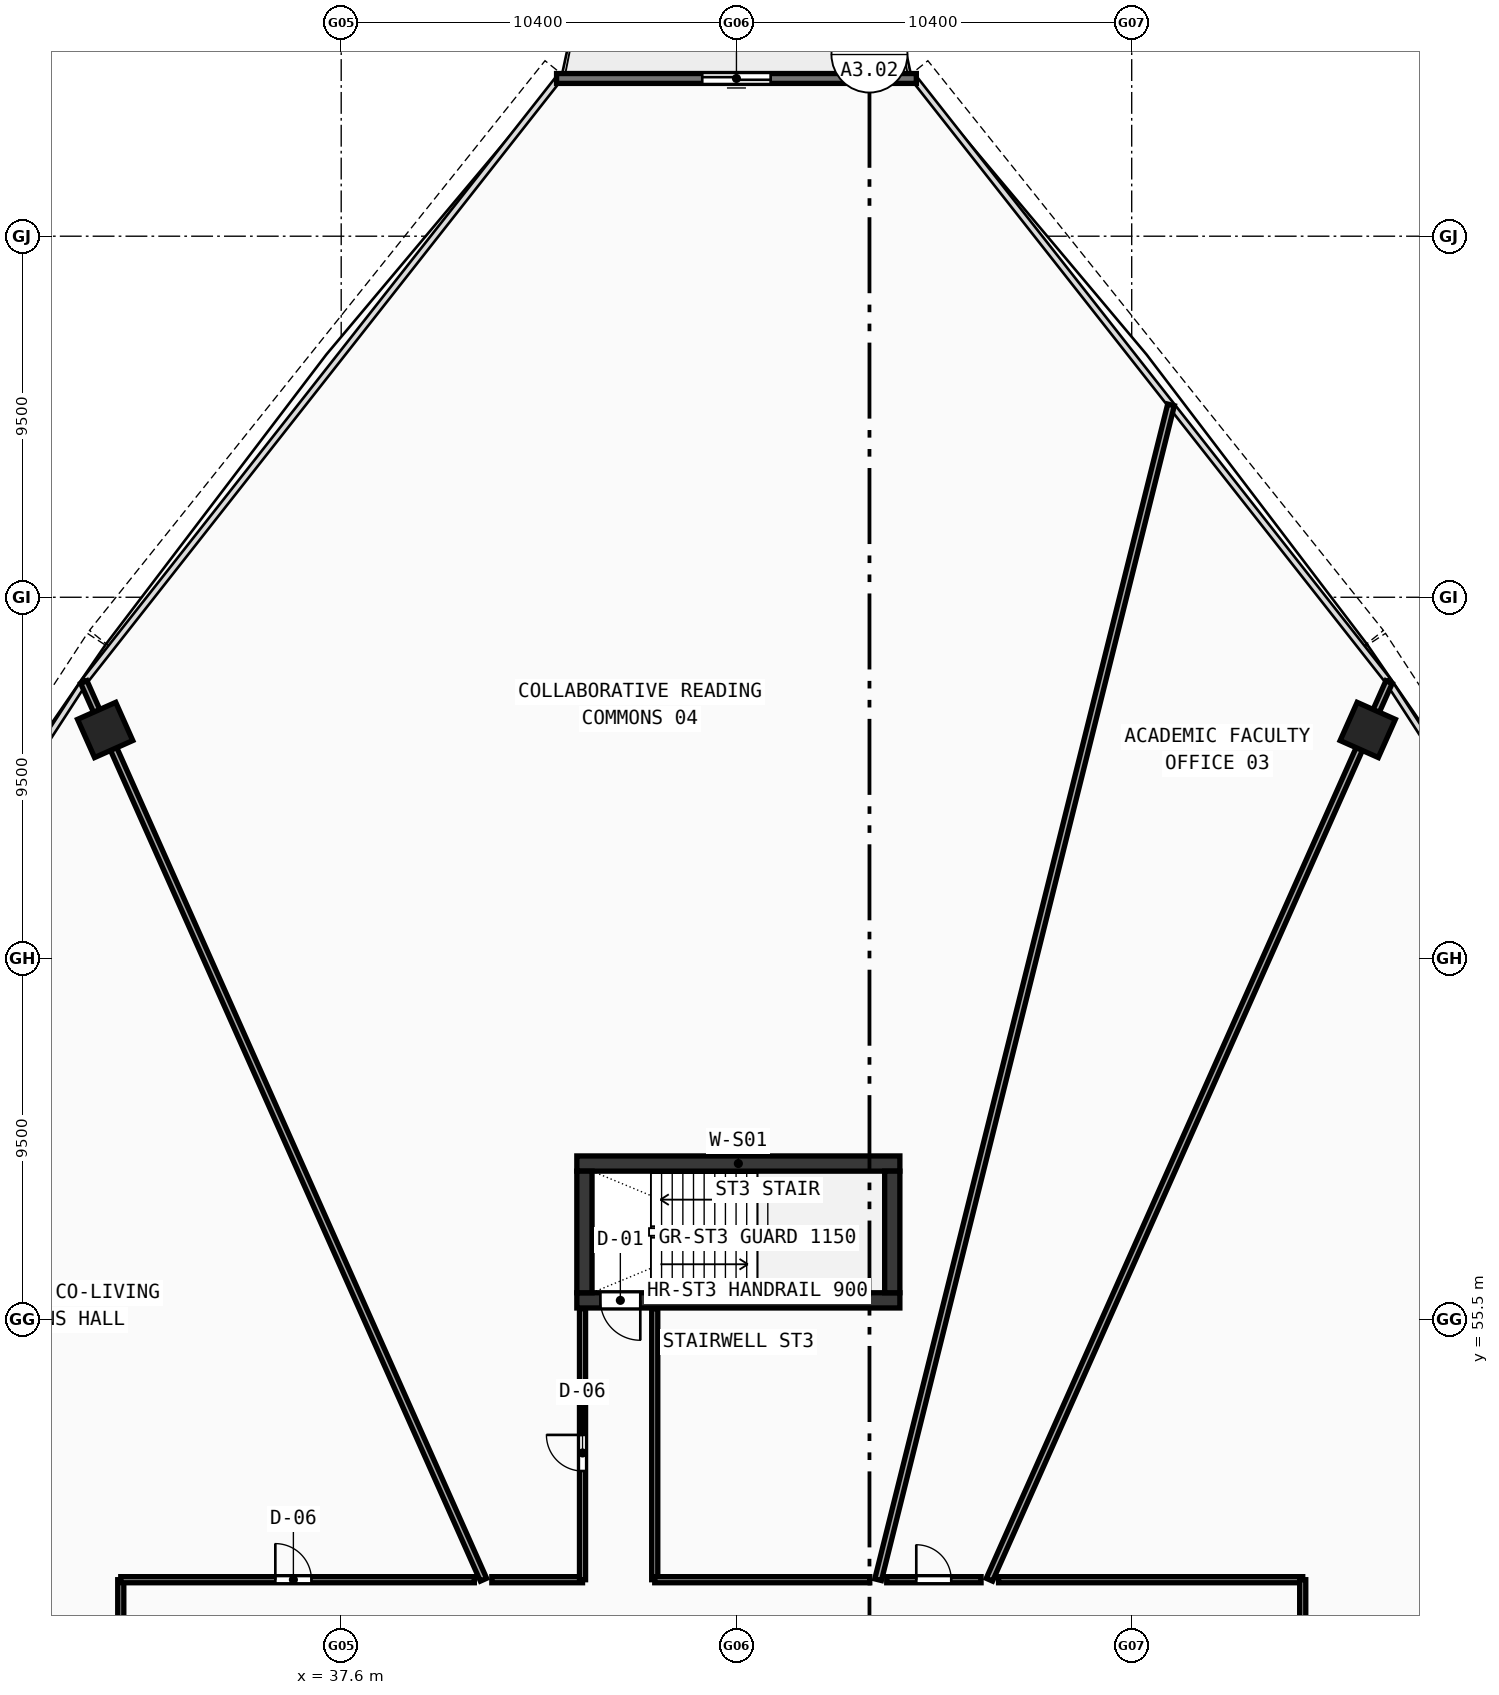
"""IFC4 building model, lengths in metres.
Left out: names, types, materials, properties, quantities, classifications, styles, units other than length and angle.
Written with IfcOpenShell. Run it as: python <this file> out.ifc"""

import sys

from ifc_helpers import new_model, si_unit, direction, frame, frame_2d, origin, origin_with_axes, origin_2d, place, context, subcontext, project, spatial, rectangle, hollow_rectangle, extrude, source, transform, mapped, element, fill, save


model = new_model("IFC4")
c1 = context("Model", 3, precision=1e-05, world=origin(), true_north=direction((0.0, 1.0)))
c2 = subcontext(c1, "Body", "Model", "MODEL_VIEW")
j1 = project(units=[si_unit("LENGTHUNIT", "METRE"), si_unit("PLANEANGLEUNIT", "RADIAN")], contexts=[c1])
p1 = place(None, origin())
s1 = spatial("IfcSite", under=j1, at=p1, CompositionType="ELEMENT")
p2 = place(p1, origin())
s2 = spatial("IfcBuilding", under=s1, at=p2, CompositionType="ELEMENT")
p3 = place(p2, frame((0.0, 0.0, 59.44)))
s3 = spatial("IfcBuildingStorey", under=s2, at=p3, CompositionType="ELEMENT", Elevation=59.44)
p4 = place(p3, frame((43.8, 59.6, 0.0), z_axis=(0.0, 0.0, 1.0), x_axis=(1.0, 0.0, 0.0)))
e1 = element("IfcWall", 1, at=p4, inside=s3, PredefinedType="SHEAR", context=c2, shape_type="SweptSolid", body=[
    extrude(rectangle(XDim=8.5, YDim=0.4, at=frame_2d((4.25, 0.0))), origin(), (0.0, 0.0, 1.0), 3.37),
])
p5 = place(p3, frame((43.8, 56.0, 0.0), z_axis=(0.0, 0.0, 1.0), x_axis=(1.0, 0.0, 0.0)))
e2 = element("IfcWall", 2, at=p5, inside=s3, PredefinedType="SHEAR", context=c2, shape_type="SweptSolid", body=[
    extrude(rectangle(XDim=8.5, YDim=0.4, at=frame_2d((4.25, 0.0))), origin(), (0.0, 0.0, 1.0), 3.37),
])
p6 = place(p5, frame((0.62, 0.0, 0.0)))
e3 = element("IfcOpeningElement", 3, at=p6, cuts=e2, PredefinedType="OPENING", context=c2, shape_type="SweptSolid", body=[
    extrude(rectangle(XDim=1.05, YDim=2.1, at=frame_2d((0.525, 1.05))), frame((0.0, 0.21, 0.0), z_axis=(0.0, -1.0, 0.0), x_axis=(1.0, 0.0, 0.0)), (0.0, 0.0, 1.0), 0.42),
])
for number, where, z_axis, x_axis in (
    (4, (44.0, 56.2, 0.0), (0.0, 0.0, 1.0), (0.0, 1.0, 0.0)),
    (5, (52.1, 56.2, 0.0), (0.0, 0.0, 1.0), (0.0, 1.0, 0.0)),
):
    element("IfcWall", number, at=place(p3, frame(where, z_axis=z_axis, x_axis=x_axis)), inside=s3, PredefinedType="SHEAR", context=c2, shape_type="SweptSolid", body=[
        extrude(rectangle(XDim=3.2, YDim=0.4, at=frame_2d((1.6, 0.0))), origin(), (0.0, 0.0, 1.0), 3.37),
    ])
m1 = source(origin(), c2, "Body", "SweptSolid", [
    extrude(hollow_rectangle(XDim=1.1, YDim=1.1, WallThickness=0.045, at=origin_2d()), origin(), (0.0, 0.0, 1.0), 3.63),
])
for number, where, z_axis, x_axis in (
    (6, (64.611, 71.009, -0.26), (0.0, 0.0, 1.0), (-0.914, 0.407, 0.0)),
    (7, (31.389, 71.009, -0.26), (0.0, 0.0, 1.0), (-0.914, -0.407, 0.0)),
):
    element("IfcColumn", number, at=place(p3, frame(where, z_axis=z_axis, x_axis=x_axis)), inside=s3, PredefinedType="COLUMN", context=c2, shape_type="MappedRepresentation", body=[
        mapped(m1, transform((0.0, 0.0, 0.0), scale=1.0)),
    ])
p7 = place(p3, frame((52.733, 88.15, 0.0), z_axis=(0.0, 0.0, 1.0), x_axis=(-1.0, 0.0, 0.0)))
e8 = element("IfcWall", 8, at=p7, inside=s3, PredefinedType="STANDARD", context=c2, shape_type="SweptSolid", body=[
    extrude(rectangle(XDim=9.466, YDim=0.26, at=frame_2d((4.733, 0.0))), origin(), (0.0, 0.0, 1.0), 3.37),
])
p8 = place(p7, frame((3.833, 0.0, 0.0)))
e9 = element("IfcOpeningElement", 9, at=p8, cuts=e8, PredefinedType="OPENING", context=c2, shape_type="SweptSolid", body=[
    extrude(rectangle(XDim=1.8, YDim=2.15, at=frame_2d((0.9, 1.075))), frame((0.0, 0.14, 0.0), z_axis=(0.0, -1.0, 0.0), x_axis=(1.0, 0.0, 0.0)), (0.0, 0.0, 1.0), 0.28),
])
p9 = place(p3, frame((54.656, 48.65, 0.0), z_axis=(0.0, 0.0, 1.0), x_axis=(0.406729800422, 0.913548504158, 0.0)))
e10 = element("IfcWall", 10, at=p9, inside=s3, PredefinedType="PARTITIONING", context=c2, shape_type="SweptSolid", body=[
    extrude(rectangle(XDim=25.854, YDim=0.18, at=frame_2d((12.927, 0.0))), origin(), (0.0, 0.0, 1.0), 2.67),
])
p10 = place(p3, frame((51.728, 48.65, 0.0), z_axis=(0.0, 0.0, 1.0), x_axis=(0.241918895985, 0.970296474159, 0.0)))
e11 = element("IfcWall", 11, at=p10, inside=s3, PredefinedType="PARTITIONING", context=c2, shape_type="SweptSolid", body=[
    extrude(rectangle(XDim=31.858, YDim=0.18, at=frame_2d((15.929, 0.0))), origin(), (0.0, 0.0, 1.0), 2.67),
])
p11 = place(p3, frame((41.344, 48.65, 0.0), z_axis=(0.0, 0.0, 1.0), x_axis=(-0.406729800422, 0.913548504158, 0.0)))
e12 = element("IfcWall", 12, at=p11, inside=s3, PredefinedType="PARTITIONING", context=c2, shape_type="SweptSolid", body=[
    extrude(rectangle(XDim=25.854, YDim=0.18, at=frame_2d((12.927, 0.0))), origin(), (0.0, 0.0, 1.0), 2.67),
])
p12 = place(p3, frame((31.8, 41.601, 0.0), z_axis=(0.0, 0.0, 1.0), x_axis=(-0.898795978277, 0.438367185625, 0.0)))
e13 = element("IfcWall", 13, at=p12, inside=s3, PredefinedType="PARTITIONING", context=c2, shape_type="SweptSolid", body=[
    extrude(rectangle(XDim=16.788, YDim=0.18, at=frame_2d((8.394, 0.0))), origin(), (0.0, 0.0, 1.0), 2.67),
])
p13 = place(p3, frame((31.8, 41.846, 0.0), z_axis=(0.0, 0.0, 1.0), x_axis=(0.0, 1.0, 0.0)))
e14 = element("IfcWall", 14, at=p13, inside=s3, PredefinedType="PARTITIONING", context=c2, shape_type="SweptSolid", body=[
    extrude(rectangle(XDim=6.804, YDim=0.16, at=frame_2d((3.402, 0.0))), origin(), (0.0, 0.0, 1.0), 2.67),
])
p14 = place(p3, frame((31.8, 48.65, 0.0), z_axis=(0.0, 0.0, 1.0), x_axis=(1.0, 0.0, 0.0)))
e15 = element("IfcWall", 15, at=p14, inside=s3, PredefinedType="PARTITIONING", context=c2, shape_type="SweptSolid", body=[
    extrude(rectangle(XDim=9.303, YDim=0.16, at=frame_2d((4.651, 0.0))), origin(), (0.0, 0.0, 1.0), 2.97),
])
p15 = place(p14, frame((4.067, 0.0, 0.0)))
e16 = element("IfcOpeningElement", 16, at=p15, cuts=e15, PredefinedType="OPENING", context=c2, shape_type="SweptSolid", body=[
    extrude(rectangle(XDim=0.95, YDim=2.1, at=frame_2d((0.475, 1.05))), frame((0.0, 0.09, 0.0), z_axis=(0.0, -1.0, 0.0), x_axis=(1.0, 0.0, 0.0)), (0.0, 0.0, 1.0), 0.18),
])
p16 = place(p3, frame((41.564, 48.65, 0.0), z_axis=(0.0, 0.0, 1.0), x_axis=(1.0, 0.0, 0.0)))
e17 = element("IfcWall", 17, at=p16, inside=s3, PredefinedType="PARTITIONING", context=c2, shape_type="SweptSolid", body=[
    extrude(rectangle(XDim=2.386, YDim=0.16, at=frame_2d((1.193, 0.0))), origin(), (0.0, 0.0, 1.0), 2.67),
])
p17 = place(p3, frame((43.95, 48.65, 0.0), z_axis=(0.0, 0.0, 1.0), x_axis=(0.0, 1.0, 0.0)))
e18 = element("IfcWall", 18, at=p17, inside=s3, PredefinedType="PARTITIONING", context=c2, shape_type="SweptSolid", body=[
    extrude(rectangle(XDim=7.13, YDim=0.16, at=frame_2d((3.565, 0.0))), origin(), (0.0, 0.0, 1.0), 2.97),
])
p18 = place(p17, frame((2.86, 0.0, 0.0)))
e19 = element("IfcOpeningElement", 19, at=p18, cuts=e18, PredefinedType="OPENING", context=c2, shape_type="SweptSolid", body=[
    extrude(rectangle(XDim=0.95, YDim=2.1, at=frame_2d((0.475, 1.05))), frame((0.0, 0.09, 0.0), z_axis=(0.0, -1.0, 0.0), x_axis=(1.0, 0.0, 0.0)), (0.0, 0.0, 1.0), 0.18),
])
p19 = place(p3, frame((45.85, 55.78, 0.0), z_axis=(0.0, 0.0, 1.0), x_axis=(0.0, -1.0, 0.0)))
e20 = element("IfcWall", 20, at=p19, inside=s3, PredefinedType="PARTITIONING", context=c2, shape_type="SweptSolid", body=[
    extrude(rectangle(XDim=7.13, YDim=0.16, at=frame_2d((3.565, 0.0))), origin(), (0.0, 0.0, 1.0), 2.97),
])
p20 = place(p3, frame((45.85, 48.65, 0.0), z_axis=(0.0, 0.0, 1.0), x_axis=(1.0, 0.0, 0.0)))
e21 = element("IfcWall", 21, at=p20, inside=s3, PredefinedType="PARTITIONING", context=c2, shape_type="SweptSolid", body=[
    extrude(rectangle(XDim=5.658, YDim=0.16, at=frame_2d((2.829, 0.0))), origin(), (0.0, 0.0, 1.0), 3.37),
])
p21 = place(p3, frame((51.954, 48.65, 0.0), z_axis=(0.0, 0.0, 1.0), x_axis=(1.0, 0.0, 0.0)))
e22 = element("IfcWall", 22, at=p21, inside=s3, PredefinedType="PARTITIONING", context=c2, shape_type="SweptSolid", body=[
    extrude(rectangle(XDim=2.482, YDim=0.16, at=frame_2d((1.241, 0.0))), origin(), (0.0, 0.0, 1.0), 2.67),
])
p22 = place(p21, frame((0.778, 0.0, 0.0)))
e23 = element("IfcOpeningElement", 23, at=p22, cuts=e22, PredefinedType="OPENING", context=c2, shape_type="SweptSolid", body=[
    extrude(rectangle(XDim=0.92, YDim=2.1, at=frame_2d((0.46, 1.05))), frame((0.0, 0.09, 0.0), z_axis=(0.0, -1.0, 0.0), x_axis=(1.0, 0.0, 0.0)), (0.0, 0.0, 1.0), 0.18),
])
p23 = place(p3, frame((54.897, 48.65, 0.0), z_axis=(0.0, 0.0, 1.0), x_axis=(1.0, 0.0, 0.0)))
e24 = element("IfcWall", 24, at=p23, inside=s3, PredefinedType="PARTITIONING", context=c2, shape_type="SweptSolid", body=[
    extrude(rectangle(XDim=8.003, YDim=0.16, at=frame_2d((4.001, 0.0))), origin(), (0.0, 0.0, 1.0), 2.97),
])
p24 = place(p3, frame((62.9, 48.65, 0.0), z_axis=(0.0, 0.0, 1.0), x_axis=(0.0, -1.0, 0.0)))
e25 = element("IfcWall", 25, at=p24, inside=s3, PredefinedType="PARTITIONING", context=c2, shape_type="SweptSolid", body=[
    extrude(rectangle(XDim=9.877, YDim=0.16, at=frame_2d((4.938, 0.0))), origin(), (0.0, 0.0, 1.0), 2.67),
])
p25 = place(p24, frame((4.349, 0.0, 0.0)))
e26 = element("IfcOpeningElement", 26, at=p25, cuts=e25, PredefinedType="OPENING", context=c2, shape_type="SweptSolid", body=[
    extrude(rectangle(XDim=0.95, YDim=2.1, at=frame_2d((0.475, 1.05))), frame((0.0, 0.09, 0.0), z_axis=(0.0, -1.0, 0.0), x_axis=(1.0, 0.0, 0.0)), (0.0, 0.0, 1.0), 0.18),
])
m2 = source(origin(), c2, "Body", "SweptSolid", [
    extrude(rectangle(XDim=1.8, YDim=2.15, at=frame_2d((0.9, 1.075))), frame((0.0, 0.025, 0.0), z_axis=(0.0, -1.0, 0.0), x_axis=(1.0, 0.0, 0.0)), (0.0, 0.0, 1.0), 0.05),
])
p26 = place(p8, origin_with_axes())
e27 = element("IfcDoor", 27, at=p26, inside=s3, OperationType="DOUBLE_DOOR_SLIDING", PredefinedType="DOOR", context=c2, shape_type="MappedRepresentation", body=[
    mapped(m2, transform((0.0, 0.0, 0.0), scale=1.0)),
])
fill(e9, e27)
m3 = source(origin(), c2, "Body", "SweptSolid", [
    extrude(rectangle(XDim=1.05, YDim=2.1, at=frame_2d((0.525, 1.05))), frame((0.0, 0.025, 0.0), z_axis=(0.0, -1.0, 0.0), x_axis=(1.0, 0.0, 0.0)), (0.0, 0.0, 1.0), 0.05),
])
p27 = place(p6, frame((1.05, 0.0, 0.0), z_axis=(0.0, 0.0, 1.0), x_axis=(-1.0, 0.0, 0.0)))
e28 = element("IfcDoor", 28, at=p27, inside=s3, OperationType="SINGLE_SWING_LEFT", PredefinedType="DOOR", context=c2, shape_type="MappedRepresentation", body=[
    mapped(m3, transform((0.0, 0.0, 0.0), scale=1.0)),
])
fill(e3, e28)
m4 = source(origin(), c2, "Body", "SweptSolid", [
    extrude(rectangle(XDim=0.92, YDim=2.1, at=frame_2d((0.46, 1.05))), frame((0.0, 0.025, 0.0), z_axis=(0.0, -1.0, 0.0), x_axis=(1.0, 0.0, 0.0)), (0.0, 0.0, 1.0), 0.05),
])
p28 = place(p22, origin_with_axes())
e29 = element("IfcDoor", 29, at=p28, inside=s3, OperationType="SINGLE_SWING_LEFT", PredefinedType="DOOR", context=c2, shape_type="MappedRepresentation", body=[
    mapped(m4, transform((0.0, 0.0, 0.0), scale=1.0)),
])
fill(e23, e29)
m5 = source(origin(), c2, "Body", "SweptSolid", [
    extrude(rectangle(XDim=0.95, YDim=2.1, at=frame_2d((0.475, 1.05))), frame((0.0, 0.025, 0.0), z_axis=(0.0, -1.0, 0.0), x_axis=(1.0, 0.0, 0.0)), (0.0, 0.0, 1.0), 0.05),
])
p29 = place(p18, origin_with_axes())
e30 = element("IfcDoor", 30, at=p29, inside=s3, OperationType="SINGLE_SWING_RIGHT", PredefinedType="DOOR", context=c2, shape_type="MappedRepresentation", body=[
    mapped(m5, transform((0.0, 0.0, 0.0), scale=1.0)),
])
fill(e19, e30)
p30 = place(p15, origin_with_axes())
e31 = element("IfcDoor", 31, at=p30, inside=s3, OperationType="SINGLE_SWING_LEFT", PredefinedType="DOOR", context=c2, shape_type="MappedRepresentation", body=[
    mapped(m5, transform((0.0, 0.0, 0.0), scale=1.0)),
])
fill(e16, e31)
save(model, sys.argv[1])
